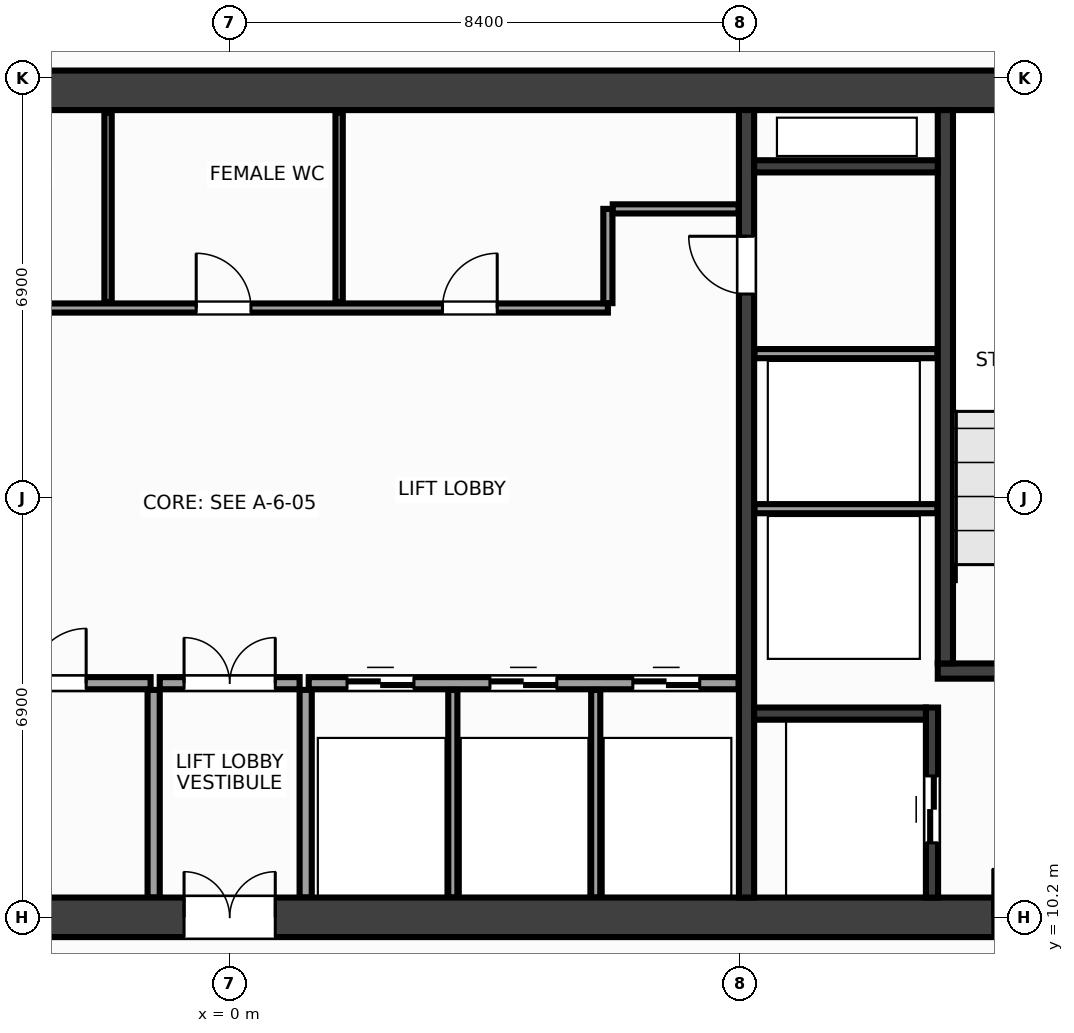
"""IFC4 building model, lengths in metres.
Left out: names, types, materials, properties, quantities, classifications, styles, units other than length and angle.
Written with IfcOpenShell. Run it as: python <this file> out.ifc"""

import sys

from ifc_helpers import new_model, si_unit, direction, frame, frame_2d, origin, place, context, subcontext, project, spatial, rectangle, extrude, source, transform, mapped, element, fill, save


model = new_model("IFC4")
c1 = context("Model", 3, precision=1e-05, world=origin(), true_north=direction((0.0, 1.0)))
c2 = subcontext(c1, "Body", "Model", "MODEL_VIEW")
j1 = project(units=[si_unit("LENGTHUNIT", "METRE"), si_unit("PLANEANGLEUNIT", "RADIAN")], contexts=[c1])
p1 = place(None, origin())
s1 = spatial("IfcSite", under=j1, at=p1, CompositionType="ELEMENT")
p2 = place(p1, origin())
s2 = spatial("IfcBuilding", under=s1, at=p2, CompositionType="ELEMENT")
p3 = place(p2, frame((0.0, 0.0, 156.8)))
s3 = spatial("IfcBuildingStorey", under=s2, at=p3, CompositionType="ELEMENT", Elevation=156.8)
m1 = source(origin(), c2, "Body", "SweptSolid", [
    extrude(rectangle(XDim=31.85, YDim=0.65, at=frame_2d((15.925, 0.0))), origin(), (0.0, 0.0, 1.0), 3.6),
])
p4 = place(p3, frame((-15.925, 23.8, 0.0), z_axis=(0.0, 0.0, 1.0), x_axis=(1.0, 0.0, 0.0)))
e1 = element("IfcWall", 1, at=p4, inside=s3, PredefinedType="SHEAR", context=c2, shape_type="MappedRepresentation", body=[
    mapped(m1, transform((0.0, 0.0, 0.0), x_axis=(1.0, 0.0, 0.0), y_axis=(0.0, 1.0, 0.0), z_axis=(0.0, 0.0, 1.0), scale=1.0)),
])
p5 = place(p3, frame((-15.925, 10.2, 0.0), z_axis=(0.0, 0.0, 1.0), x_axis=(1.0, 0.0, 0.0)))
e2 = element("IfcWall", 2, at=p5, inside=s3, PredefinedType="SHEAR", context=c2, shape_type="MappedRepresentation", body=[
    mapped(m1, transform((0.0, 0.0, 0.0), x_axis=(1.0, 0.0, 0.0), y_axis=(0.0, 1.0, 0.0), z_axis=(0.0, 0.0, 1.0), scale=1.0)),
])
p6 = place(p5, frame((1.775, 0.0, 0.0)))
e3 = element("IfcOpeningElement", 3, at=p6, cuts=e2, PredefinedType="OPENING", context=c2, shape_type="SweptSolid", body=[
    extrude(rectangle(XDim=1.6, YDim=2.15, at=frame_2d((0.8, 1.075))), frame((0.0, 0.337, 0.0), z_axis=(0.0, -1.0, 0.0), x_axis=(1.0, 0.0, 0.0)), (0.0, 0.0, 1.0), 0.674),
])
p7 = place(p5, frame((28.475, 0.0, 0.0)))
e4 = element("IfcOpeningElement", 4, at=p7, cuts=e2, PredefinedType="OPENING", context=c2, shape_type="SweptSolid", body=[
    extrude(rectangle(XDim=1.6, YDim=2.15, at=frame_2d((0.8, 1.075))), frame((0.0, 0.337, 0.0), z_axis=(0.0, -1.0, 0.0), x_axis=(1.0, 0.0, 0.0)), (0.0, 0.0, 1.0), 0.674),
])
p8 = place(p5, frame((15.175, 0.0, 0.0)))
e5 = element("IfcOpeningElement", 5, at=p8, cuts=e2, PredefinedType="OPENING", context=c2, shape_type="SweptSolid", body=[
    extrude(rectangle(XDim=1.5, YDim=2.2, at=frame_2d((0.75, 1.1))), frame((0.0, 0.337, 0.0), z_axis=(0.0, -1.0, 0.0), x_axis=(1.0, 0.0, 0.0)), (0.0, 0.0, 1.0), 0.674),
])
m2 = source(origin(), c2, "Body", "SweptSolid", [
    extrude(rectangle(XDim=12.95, YDim=0.25, at=frame_2d((6.475, 0.0))), origin(), (0.0, 0.0, 1.0), 3.6),
])
p9 = place(p3, frame((8.5, 10.525, 0.0), z_axis=(0.0, 0.0, 1.0), x_axis=(0.0, 1.0, 0.0)))
e6 = element("IfcWall", 6, at=p9, inside=s3, PredefinedType="SHEAR", context=c2, shape_type="MappedRepresentation", body=[
    mapped(m2, transform((0.0, 0.0, 0.0), x_axis=(1.0, 0.0, 0.0), y_axis=(0.0, 1.0, 0.0), z_axis=(0.0, 0.0, 1.0), scale=1.0)),
])
p10 = place(p9, frame((9.925, 0.0, 0.0)))
e7 = element("IfcOpeningElement", 7, at=p10, cuts=e6, PredefinedType="OPENING", context=c2, shape_type="SweptSolid", body=[
    extrude(rectangle(XDim=0.95, YDim=2.15, at=frame_2d((0.475, 1.075))), frame((0.0, 0.137, 0.0), z_axis=(0.0, -1.0, 0.0), x_axis=(1.0, 0.0, 0.0)), (0.0, 0.0, 1.0), 0.274),
])
m3 = source(origin(), c2, "Body", "SweptSolid", [
    extrude(rectangle(XDim=3.63, YDim=0.25, at=frame_2d((1.815, 0.0))), origin(), (0.0, 0.0, 1.0), 3.6),
])
p11 = place(p3, frame((11.645, 14.25, 0.0), z_axis=(0.0, 0.0, 1.0), x_axis=(1.0, 0.0, 0.0)))
e8 = element("IfcWall", 8, at=p11, inside=s3, PredefinedType="SHEAR", context=c2, shape_type="MappedRepresentation", body=[
    mapped(m3, transform((0.0, 0.0, 0.0), x_axis=(1.0, 0.0, 0.0), y_axis=(0.0, 1.0, 0.0), z_axis=(0.0, 0.0, 1.0), scale=1.0)),
])
p12 = place(p11, frame((0.95, 0.0, 0.0)))
e9 = element("IfcOpeningElement", 9, at=p12, cuts=e8, PredefinedType="OPENING", context=c2, shape_type="SweptSolid", body=[
    extrude(rectangle(XDim=1.6, YDim=2.15, at=frame_2d((0.8, 1.075))), frame((0.0, 0.137, 0.0), z_axis=(0.0, -1.0, 0.0), x_axis=(1.0, 0.0, 0.0)), (0.0, 0.0, 1.0), 0.274),
])
m4 = source(origin(), c2, "Body", "SweptSolid", [
    extrude(rectangle(XDim=9.1, YDim=0.25, at=frame_2d((4.55, 0.0))), origin(), (0.0, 0.0, 1.0), 3.6),
])
p13 = place(p3, frame((11.77, 14.375, 0.0), z_axis=(0.0, 0.0, 1.0), x_axis=(0.0, 1.0, 0.0)))
e10 = element("IfcWall", 10, at=p13, inside=s3, PredefinedType="SHEAR", context=c2, shape_type="MappedRepresentation", body=[
    mapped(m4, transform((0.0, 0.0, 0.0), x_axis=(1.0, 0.0, 0.0), y_axis=(0.0, 1.0, 0.0), z_axis=(0.0, 0.0, 1.0), scale=1.0)),
])
m5 = source(origin(), c2, "Body", "SweptSolid", [
    extrude(rectangle(XDim=3.125, YDim=0.2, at=frame_2d((1.562, 0.0))), origin(), (0.0, 0.0, 1.0), 3.6),
])
p14 = place(p3, frame((11.55, 10.525, 0.0), z_axis=(0.0, 0.0, 1.0), x_axis=(0.0, 1.0, 0.0)))
e11 = element("IfcWall", 11, at=p14, inside=s3, PredefinedType="SHEAR", context=c2, shape_type="MappedRepresentation", body=[
    mapped(m5, transform((0.0, 0.0, 0.0), x_axis=(1.0, 0.0, 0.0), y_axis=(0.0, 1.0, 0.0), z_axis=(0.0, 0.0, 1.0), scale=1.0)),
])
p15 = place(p14, frame((0.9, 0.0, 0.0)))
e12 = element("IfcOpeningElement", 12, at=p15, cuts=e11, PredefinedType="OPENING", context=c2, shape_type="SweptSolid", body=[
    extrude(rectangle(XDim=1.1, YDim=2.15, at=frame_2d((0.55, 1.075))), frame((0.0, 0.112, 0.0), z_axis=(0.0, -1.0, 0.0), x_axis=(1.0, 0.0, 0.0)), (0.0, 0.0, 1.0), 0.224),
])
m6 = source(origin(), c2, "Body", "SweptSolid", [
    extrude(rectangle(XDim=2.825, YDim=0.2, at=frame_2d((1.413, 0.0))), origin(), (0.0, 0.0, 1.0), 3.6),
])
p16 = place(p3, frame((8.625, 13.55, 0.0), z_axis=(0.0, 0.0, 1.0), x_axis=(1.0, 0.0, 0.0)))
e13 = element("IfcWall", 13, at=p16, inside=s3, PredefinedType="SHEAR", context=c2, shape_type="MappedRepresentation", body=[
    mapped(m6, transform((0.0, 0.0, 0.0), x_axis=(1.0, 0.0, 0.0), y_axis=(0.0, 1.0, 0.0), z_axis=(0.0, 0.0, 1.0), scale=1.0)),
])
m7 = source(origin(), c2, "Body", "SweptSolid", [
    extrude(rectangle(XDim=3.02, YDim=0.2, at=frame_2d((1.51, 0.0))), origin(), (0.0, 0.0, 1.0), 3.6),
])
p17 = place(p3, frame((8.625, 22.55, 0.0), z_axis=(0.0, 0.0, 1.0), x_axis=(1.0, 0.0, 0.0)))
e14 = element("IfcWall", 14, at=p17, inside=s3, PredefinedType="SHEAR", context=c2, shape_type="MappedRepresentation", body=[
    mapped(m7, transform((0.0, 0.0, 0.0), x_axis=(1.0, 0.0, 0.0), y_axis=(0.0, 1.0, 0.0), z_axis=(0.0, 0.0, 1.0), scale=1.0)),
])
m8 = source(origin(), c2, "Body", "SweptSolid", [
    extrude(rectangle(XDim=3.01, YDim=0.15, at=frame_2d((1.505, 0.0))), origin(), (0.0, 0.0, 1.0), 3.38),
])
for number, where, z_axis, x_axis in (
    (15, (8.63, 16.92, 0.0), (0.0, 0.0, 1.0), (1.0, 0.0, 0.0)),
    (16, (8.63, 19.47, 0.0), (0.0, 0.0, 1.0), (1.0, 0.0, 0.0)),
):
    element("IfcWall", number, at=place(p3, frame(where, z_axis=z_axis, x_axis=x_axis)), inside=s3, PredefinedType="PARTITIONING", context=c2, shape_type="MappedRepresentation", body=[
        mapped(m8, transform((0.0, 0.0, 0.0), x_axis=(1.0, 0.0, 0.0), y_axis=(0.0, 1.0, 0.0), z_axis=(0.0, 0.0, 1.0), scale=1.0)),
    ])
m9 = source(origin(), c2, "Body", "SweptSolid", [
    extrude(rectangle(XDim=7.07, YDim=0.2, at=frame_2d((3.535, 0.0))), origin(), (0.0, 0.0, 1.0), 3.38),
])
p18 = place(p3, frame((-8.37, 14.05, 0.0), z_axis=(0.0, 0.0, 1.0), x_axis=(1.0, 0.0, 0.0)))
e17 = element("IfcWall", 17, at=p18, inside=s3, PredefinedType="PARTITIONING", context=c2, shape_type="MappedRepresentation", body=[
    mapped(m9, transform((0.0, 0.0, 0.0), x_axis=(1.0, 0.0, 0.0), y_axis=(0.0, 1.0, 0.0), z_axis=(0.0, 0.0, 1.0), scale=1.0)),
])
p19 = place(p18, frame((1.66, 0.0, 0.0)))
e18 = element("IfcOpeningElement", 18, at=p19, cuts=e17, PredefinedType="OPENING", context=c2, shape_type="SweptSolid", body=[
    extrude(rectangle(XDim=0.9, YDim=2.15, at=frame_2d((0.45, 1.075))), frame((0.0, 0.112, 0.0), z_axis=(0.0, -1.0, 0.0), x_axis=(1.0, 0.0, 0.0)), (0.0, 0.0, 1.0), 0.224),
])
p20 = place(p18, frame((5.11, 0.0, 0.0)))
e19 = element("IfcOpeningElement", 19, at=p20, cuts=e17, PredefinedType="OPENING", context=c2, shape_type="SweptSolid", body=[
    extrude(rectangle(XDim=0.9, YDim=2.15, at=frame_2d((0.45, 1.075))), frame((0.0, 0.112, 0.0), z_axis=(0.0, -1.0, 0.0), x_axis=(1.0, 0.0, 0.0)), (0.0, 0.0, 1.0), 0.224),
])
p21 = place(p3, frame((1.3, 14.05, 0.0), z_axis=(0.0, 0.0, 1.0), x_axis=(1.0, 0.0, 0.0)))
e20 = element("IfcWall", 20, at=p21, inside=s3, PredefinedType="PARTITIONING", context=c2, shape_type="MappedRepresentation", body=[
    mapped(m9, transform((0.0, 0.0, 0.0), x_axis=(1.0, 0.0, 0.0), y_axis=(0.0, 1.0, 0.0), z_axis=(0.0, 0.0, 1.0), scale=1.0)),
])
p22 = place(p21, frame((0.63, 0.0, 0.0)))
e21 = element("IfcOpeningElement", 21, at=p22, cuts=e20, PredefinedType="OPENING", context=c2, shape_type="SweptSolid", body=[
    extrude(rectangle(XDim=1.1, YDim=2.15, at=frame_2d((0.55, 1.075))), frame((0.0, 0.112, 0.0), z_axis=(0.0, -1.0, 0.0), x_axis=(1.0, 0.0, 0.0)), (0.0, 0.0, 1.0), 0.224),
])
p23 = place(p21, frame((2.98, 0.0, 0.0)))
e22 = element("IfcOpeningElement", 22, at=p23, cuts=e20, PredefinedType="OPENING", context=c2, shape_type="SweptSolid", body=[
    extrude(rectangle(XDim=1.1, YDim=2.15, at=frame_2d((0.55, 1.075))), frame((0.0, 0.112, 0.0), z_axis=(0.0, -1.0, 0.0), x_axis=(1.0, 0.0, 0.0)), (0.0, 0.0, 1.0), 0.224),
])
p24 = place(p21, frame((5.33, 0.0, 0.0)))
e23 = element("IfcOpeningElement", 23, at=p24, cuts=e20, PredefinedType="OPENING", context=c2, shape_type="SweptSolid", body=[
    extrude(rectangle(XDim=1.1, YDim=2.15, at=frame_2d((0.55, 1.075))), frame((0.0, 0.112, 0.0), z_axis=(0.0, -1.0, 0.0), x_axis=(1.0, 0.0, 0.0)), (0.0, 0.0, 1.0), 0.224),
])
m10 = source(origin(), c2, "Body", "SweptSolid", [
    extrude(rectangle(XDim=3.415, YDim=0.2, at=frame_2d((1.708, 0.0))), origin(), (0.0, 0.0, 1.0), 3.38),
])
for number, where, z_axis, x_axis in (
    (24, (-1.25, 10.525, 0.0), (0.0, 0.0, 1.0), (0.0, 1.0, 0.0)),
    (25, (1.25, 10.525, 0.0), (0.0, 0.0, 1.0), (0.0, 1.0, 0.0)),
):
    element("IfcWall", number, at=place(p3, frame(where, z_axis=z_axis, x_axis=x_axis)), inside=s3, PredefinedType="PARTITIONING", context=c2, shape_type="MappedRepresentation", body=[
        mapped(m10, transform((0.0, 0.0, 0.0), x_axis=(1.0, 0.0, 0.0), y_axis=(0.0, 1.0, 0.0), z_axis=(0.0, 0.0, 1.0), scale=1.0)),
    ])
m11 = source(origin(), c2, "Body", "SweptSolid", [
    extrude(rectangle(XDim=2.3, YDim=0.2, at=frame_2d((1.15, 0.0))), origin(), (0.0, 0.0, 1.0), 3.38),
])
p25 = place(p3, frame((-1.15, 14.05, 0.0), z_axis=(0.0, 0.0, 1.0), x_axis=(1.0, 0.0, 0.0)))
e26 = element("IfcWall", 26, at=p25, inside=s3, PredefinedType="PARTITIONING", context=c2, shape_type="MappedRepresentation", body=[
    mapped(m11, transform((0.0, 0.0, 0.0), x_axis=(1.0, 0.0, 0.0), y_axis=(0.0, 1.0, 0.0), z_axis=(0.0, 0.0, 1.0), scale=1.0)),
])
p26 = place(p25, frame((0.4, 0.0, 0.0)))
e27 = element("IfcOpeningElement", 27, at=p26, cuts=e26, PredefinedType="OPENING", context=c2, shape_type="SweptSolid", body=[
    extrude(rectangle(XDim=1.5, YDim=2.2, at=frame_2d((0.75, 1.1))), frame((0.0, 0.112, 0.0), z_axis=(0.0, -1.0, 0.0), x_axis=(1.0, 0.0, 0.0)), (0.0, 0.0, 1.0), 0.224),
])
m12 = source(origin(), c2, "Body", "SweptSolid", [
    extrude(rectangle(XDim=14.59, YDim=0.15, at=frame_2d((7.295, 0.0))), origin(), (0.0, 0.0, 1.0), 3.38),
])
p27 = place(p3, frame((-8.37, 20.22, 0.0), z_axis=(0.0, 0.0, 1.0), x_axis=(1.0, 0.0, 0.0)))
e28 = element("IfcWall", 28, at=p27, inside=s3, PredefinedType="PARTITIONING", context=c2, shape_type="MappedRepresentation", body=[
    mapped(m12, transform((0.0, 0.0, 0.0), x_axis=(1.0, 0.0, 0.0), y_axis=(0.0, 1.0, 0.0), z_axis=(0.0, 0.0, 1.0), scale=1.0)),
])
p28 = place(p27, frame((1.06, 0.0, 0.0)))
e29 = element("IfcOpeningElement", 29, at=p28, cuts=e28, PredefinedType="OPENING", context=c2, shape_type="SweptSolid", body=[
    extrude(rectangle(XDim=0.9, YDim=2.15, at=frame_2d((0.45, 1.075))), frame((0.0, 0.087, 0.0), z_axis=(0.0, -1.0, 0.0), x_axis=(1.0, 0.0, 0.0)), (0.0, 0.0, 1.0), 0.174),
])
p29 = place(p27, frame((4.22, 0.0, 0.0)))
e30 = element("IfcOpeningElement", 30, at=p29, cuts=e28, PredefinedType="OPENING", context=c2, shape_type="SweptSolid", body=[
    extrude(rectangle(XDim=0.9, YDim=2.15, at=frame_2d((0.45, 1.075))), frame((0.0, 0.087, 0.0), z_axis=(0.0, -1.0, 0.0), x_axis=(1.0, 0.0, 0.0)), (0.0, 0.0, 1.0), 0.174),
])
p30 = place(p27, frame((7.82, 0.0, 0.0)))
e31 = element("IfcOpeningElement", 31, at=p30, cuts=e28, PredefinedType="OPENING", context=c2, shape_type="SweptSolid", body=[
    extrude(rectangle(XDim=0.9, YDim=2.15, at=frame_2d((0.45, 1.075))), frame((0.0, 0.087, 0.0), z_axis=(0.0, -1.0, 0.0), x_axis=(1.0, 0.0, 0.0)), (0.0, 0.0, 1.0), 0.174),
])
p31 = place(p27, frame((11.87, 0.0, 0.0)))
e32 = element("IfcOpeningElement", 32, at=p31, cuts=e28, PredefinedType="OPENING", context=c2, shape_type="SweptSolid", body=[
    extrude(rectangle(XDim=0.9, YDim=2.15, at=frame_2d((0.45, 1.075))), frame((0.0, 0.087, 0.0), z_axis=(0.0, -1.0, 0.0), x_axis=(1.0, 0.0, 0.0)), (0.0, 0.0, 1.0), 0.174),
])
m13 = source(origin(), c2, "Body", "SweptSolid", [
    extrude(rectangle(XDim=1.55, YDim=0.15, at=frame_2d((0.775, 0.0))), origin(), (0.0, 0.0, 1.0), 3.38),
])
p32 = place(p3, frame((6.22, 20.3, 0.0), z_axis=(0.0, 0.0, 1.0), x_axis=(0.0, 1.0, 0.0)))
e33 = element("IfcWall", 33, at=p32, inside=s3, PredefinedType="PARTITIONING", context=c2, shape_type="MappedRepresentation", body=[
    mapped(m13, transform((0.0, 0.0, 0.0), x_axis=(1.0, 0.0, 0.0), y_axis=(0.0, 1.0, 0.0), z_axis=(0.0, 0.0, 1.0), scale=1.0)),
])
m14 = source(origin(), c2, "Body", "SweptSolid", [
    extrude(rectangle(XDim=2.07, YDim=0.15, at=frame_2d((1.035, 0.0))), origin(), (0.0, 0.0, 1.0), 3.38),
])
p33 = place(p3, frame((6.3, 21.85, 0.0), z_axis=(0.0, 0.0, 1.0), x_axis=(1.0, 0.0, 0.0)))
e34 = element("IfcWall", 34, at=p33, inside=s3, PredefinedType="PARTITIONING", context=c2, shape_type="MappedRepresentation", body=[
    mapped(m14, transform((0.0, 0.0, 0.0), x_axis=(1.0, 0.0, 0.0), y_axis=(0.0, 1.0, 0.0), z_axis=(0.0, 0.0, 1.0), scale=1.0)),
])
m15 = source(origin(), c2, "Body", "SweptSolid", [
    extrude(rectangle(XDim=3.415, YDim=0.15, at=frame_2d((1.708, 0.0))), origin(), (0.0, 0.0, 1.0), 3.38),
])
for number, where, z_axis, x_axis in (
    (35, (3.67, 10.525, 0.0), (0.0, 0.0, 1.0), (0.0, 1.0, 0.0)),
    (36, (6.02, 10.525, 0.0), (0.0, 0.0, 1.0), (0.0, 1.0, 0.0)),
):
    element("IfcWall", number, at=place(p3, frame(where, z_axis=z_axis, x_axis=x_axis)), inside=s3, PredefinedType="PARTITIONING", context=c2, shape_type="MappedRepresentation", body=[
        mapped(m15, transform((0.0, 0.0, 0.0), x_axis=(1.0, 0.0, 0.0), y_axis=(0.0, 1.0, 0.0), z_axis=(0.0, 0.0, 1.0), scale=1.0)),
    ])
m16 = source(origin(), c2, "Body", "SweptSolid", [
    extrude(rectangle(XDim=3.115, YDim=0.12, at=frame_2d((1.558, 0.0))), origin(), (0.0, 0.0, 1.0), 3.38),
])
for number, where, z_axis, x_axis in (
    (37, (-2.0, 20.32, 0.0), (0.0, 0.0, 1.0), (0.0, 1.0, 0.0)),
    (38, (1.8, 20.32, 0.0), (0.0, 0.0, 1.0), (0.0, 1.0, 0.0)),
):
    element("IfcWall", number, at=place(p3, frame(where, z_axis=z_axis, x_axis=x_axis)), inside=s3, PredefinedType="PARTITIONING", context=c2, shape_type="MappedRepresentation", body=[
        mapped(m16, transform((0.0, 0.0, 0.0), x_axis=(1.0, 0.0, 0.0), y_axis=(0.0, 1.0, 0.0), z_axis=(0.0, 0.0, 1.0), scale=1.0)),
    ])
m17 = source(origin(), c2, "Body", "SweptSolid", [
    extrude(rectangle(XDim=1.6, YDim=2.15, at=frame_2d((0.8, 1.075))), frame((0.0, 0.025, 0.0), z_axis=(0.0, -1.0, 0.0), x_axis=(1.0, 0.0, 0.0)), (0.0, 0.0, 1.0), 0.05),
])
p34 = place(p7, origin())
e39 = element("IfcDoor", 39, at=p34, inside=s3, OperationType="DOUBLE_DOOR_SINGLE_SWING", PredefinedType="DOOR", context=c2, shape_type="MappedRepresentation", body=[
    mapped(m17, transform((0.0, 0.0, 0.0), x_axis=(1.0, 0.0, 0.0), y_axis=(0.0, 1.0, 0.0), z_axis=(0.0, 0.0, 1.0), scale=1.0)),
])
fill(e4, e39)
m18 = source(origin(), c2, "Body", "SweptSolid", [
    extrude(rectangle(XDim=1.1, YDim=2.15, at=frame_2d((0.55, 1.075))), frame((0.0, 0.025, 0.0), z_axis=(0.0, -1.0, 0.0), x_axis=(1.0, 0.0, 0.0)), (0.0, 0.0, 1.0), 0.05),
])
p35 = place(p15, origin())
e40 = element("IfcDoor", 40, at=p35, inside=s3, OperationType="DOUBLE_DOOR_SLIDING", PredefinedType="DOOR", context=c2, shape_type="MappedRepresentation", body=[
    mapped(m18, transform((0.0, 0.0, 0.0), x_axis=(1.0, 0.0, 0.0), y_axis=(0.0, 1.0, 0.0), z_axis=(0.0, 0.0, 1.0), scale=1.0)),
])
fill(e12, e40)
m19 = source(origin(), c2, "Body", "SweptSolid", [
    extrude(rectangle(XDim=0.95, YDim=2.15, at=frame_2d((0.475, 1.075))), frame((0.0, 0.025, 0.0), z_axis=(0.0, -1.0, 0.0), x_axis=(1.0, 0.0, 0.0)), (0.0, 0.0, 1.0), 0.05),
])
p36 = place(p10, origin())
e41 = element("IfcDoor", 41, at=p36, inside=s3, OperationType="SINGLE_SWING_RIGHT", PredefinedType="DOOR", context=c2, shape_type="MappedRepresentation", body=[
    mapped(m19, transform((0.0, 0.0, 0.0), x_axis=(1.0, 0.0, 0.0), y_axis=(0.0, 1.0, 0.0), z_axis=(0.0, 0.0, 1.0), scale=1.0)),
])
fill(e7, e41)
m20 = source(origin(), c2, "Body", "SweptSolid", [
    extrude(rectangle(XDim=0.9, YDim=2.15, at=frame_2d((0.45, 1.075))), frame((0.0, 0.025, 0.0), z_axis=(0.0, -1.0, 0.0), x_axis=(1.0, 0.0, 0.0)), (0.0, 0.0, 1.0), 0.05),
])
p37 = place(p20, origin())
e42 = element("IfcDoor", 42, at=p37, inside=s3, OperationType="SINGLE_SWING_RIGHT", PredefinedType="DOOR", context=c2, shape_type="MappedRepresentation", body=[
    mapped(m20, transform((0.0, 0.0, 0.0), x_axis=(1.0, 0.0, 0.0), y_axis=(0.0, 1.0, 0.0), z_axis=(0.0, 0.0, 1.0), scale=1.0)),
])
fill(e19, e42)
p38 = place(p22, origin())
e43 = element("IfcDoor", 43, at=p38, inside=s3, OperationType="DOUBLE_DOOR_SLIDING", PredefinedType="DOOR", context=c2, shape_type="MappedRepresentation", body=[
    mapped(m18, transform((0.0, 0.0, 0.0), x_axis=(1.0, 0.0, 0.0), y_axis=(0.0, 1.0, 0.0), z_axis=(0.0, 0.0, 1.0), scale=1.0)),
])
fill(e21, e43)
p39 = place(p23, origin())
e44 = element("IfcDoor", 44, at=p39, inside=s3, OperationType="DOUBLE_DOOR_SLIDING", PredefinedType="DOOR", context=c2, shape_type="MappedRepresentation", body=[
    mapped(m18, transform((0.0, 0.0, 0.0), x_axis=(1.0, 0.0, 0.0), y_axis=(0.0, 1.0, 0.0), z_axis=(0.0, 0.0, 1.0), scale=1.0)),
])
fill(e22, e44)
p40 = place(p24, origin())
e45 = element("IfcDoor", 45, at=p40, inside=s3, OperationType="DOUBLE_DOOR_SLIDING", PredefinedType="DOOR", context=c2, shape_type="MappedRepresentation", body=[
    mapped(m18, transform((0.0, 0.0, 0.0), x_axis=(1.0, 0.0, 0.0), y_axis=(0.0, 1.0, 0.0), z_axis=(0.0, 0.0, 1.0), scale=1.0)),
])
fill(e23, e45)
m21 = source(origin(), c2, "Body", "SweptSolid", [
    extrude(rectangle(XDim=1.5, YDim=2.2, at=frame_2d((0.75, 1.1))), frame((0.0, 0.025, 0.0), z_axis=(0.0, -1.0, 0.0), x_axis=(1.0, 0.0, 0.0)), (0.0, 0.0, 1.0), 0.05),
])
p41 = place(p26, origin())
e46 = element("IfcDoor", 46, at=p41, inside=s3, OperationType="DOUBLE_DOOR_SINGLE_SWING", PredefinedType="DOOR", context=c2, shape_type="MappedRepresentation", body=[
    mapped(m21, transform((0.0, 0.0, 0.0), x_axis=(1.0, 0.0, 0.0), y_axis=(0.0, 1.0, 0.0), z_axis=(0.0, 0.0, 1.0), scale=1.0)),
])
fill(e27, e46)
p42 = place(p8, origin())
e47 = element("IfcDoor", 47, at=p42, inside=s3, OperationType="DOUBLE_DOOR_SINGLE_SWING", PredefinedType="DOOR", context=c2, shape_type="MappedRepresentation", body=[
    mapped(m21, transform((0.0, 0.0, 0.0), x_axis=(1.0, 0.0, 0.0), y_axis=(0.0, 1.0, 0.0), z_axis=(0.0, 0.0, 1.0), scale=1.0)),
])
fill(e5, e47)
p43 = place(p30, origin())
e48 = element("IfcDoor", 48, at=p43, inside=s3, OperationType="SINGLE_SWING_LEFT", PredefinedType="DOOR", context=c2, shape_type="MappedRepresentation", body=[
    mapped(m20, transform((0.0, 0.0, 0.0), x_axis=(1.0, 0.0, 0.0), y_axis=(0.0, 1.0, 0.0), z_axis=(0.0, 0.0, 1.0), scale=1.0)),
])
fill(e31, e48)
p44 = place(p31, origin())
e49 = element("IfcDoor", 49, at=p44, inside=s3, OperationType="SINGLE_SWING_RIGHT", PredefinedType="DOOR", context=c2, shape_type="MappedRepresentation", body=[
    mapped(m20, transform((0.0, 0.0, 0.0), x_axis=(1.0, 0.0, 0.0), y_axis=(0.0, 1.0, 0.0), z_axis=(0.0, 0.0, 1.0), scale=1.0)),
])
fill(e32, e49)
save(model, sys.argv[1])
